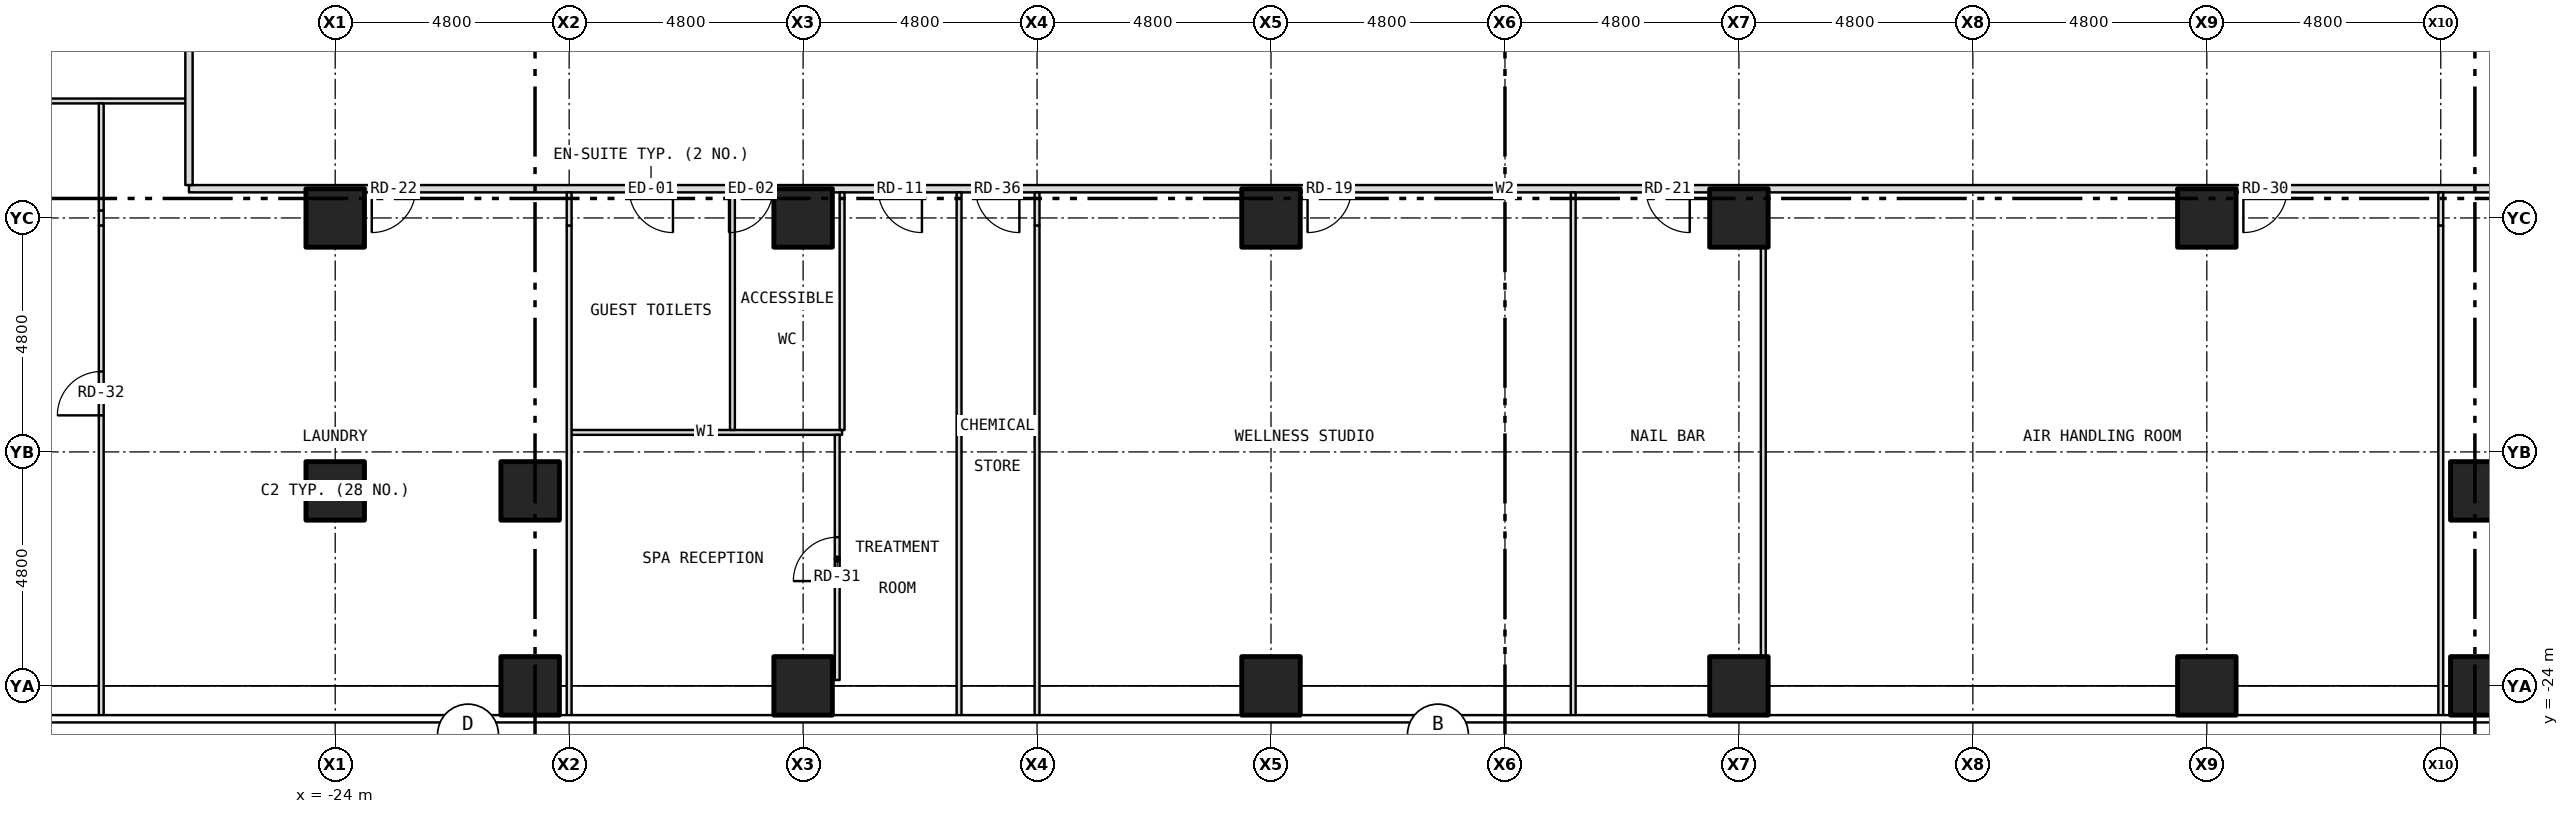
"""IFC4 building model, lengths in metres.
Left out: names, types, materials, properties, quantities, classifications, styles, units other than length and angle.
Written with IfcOpenShell. Run it as: python <this file> out.ifc"""

import sys

from ifc_helpers import new_model, si_unit, direction, frame, frame_2d, origin, origin_2d, place, context, subcontext, project, spatial, rectangle, hollow_rectangle, extrude, element, fill, save


model = new_model("IFC4")
c1 = context("Model", 3, precision=1e-05, world=origin(), true_north=direction((0.0, 1.0)))
c2 = subcontext(c1, "Body", "Model", "MODEL_VIEW")
j1 = project(units=[si_unit("LENGTHUNIT", "METRE"), si_unit("PLANEANGLEUNIT", "RADIAN")], contexts=[c1])
p1 = place(None, origin())
s1 = spatial("IfcSite", under=j1, at=p1, CompositionType="ELEMENT")
p2 = place(p1, origin())
s2 = spatial("IfcBuilding", under=s1, at=p2, CompositionType="ELEMENT")
p3 = place(p2, frame((0.0, 0.0, 20.0)))
s3 = spatial("IfcBuildingStorey", under=s2, at=p3, CompositionType="ELEMENT", Elevation=20.0)
for number, where, z_axis, x_axis in (
    (1, (-20.0, -24.0, -0.2), (0.0, 0.0, 1.0), (1.0, 0.0, 0.0)),
    (2, (-14.4, -24.0, -0.2), (0.0, 0.0, 1.0), (1.0, 0.0, 0.0)),
    (3, (-4.8, -24.0, -0.2), (0.0, 0.0, 1.0), (1.0, 0.0, 0.0)),
    (4, (4.8, -24.0, -0.2), (0.0, 0.0, 1.0), (1.0, 0.0, 0.0)),
    (5, (14.4, -24.0, -0.2), (0.0, 0.0, 1.0), (1.0, 0.0, 0.0)),
    (6, (20.0, -24.0, -0.2), (0.0, 0.0, 1.0), (1.0, 0.0, 0.0)),
    (7, (-24.0, -20.0, -0.2), (0.0, 0.0, 1.0), (1.0, 0.0, 0.0)),
    (8, (-24.0, -14.4, -0.2), (0.0, 0.0, 1.0), (1.0, 0.0, 0.0)),
    (9, (-20.0, -20.0, -0.2), (0.0, 0.0, 1.0), (1.0, 0.0, 0.0)),
    (10, (-14.4, -14.4, -0.2), (0.0, 0.0, 1.0), (1.0, 0.0, 0.0)),
    (11, (-4.8, -14.4, -0.2), (0.0, 0.0, 1.0), (1.0, 0.0, 0.0)),
    (12, (4.8, -14.4, -0.2), (0.0, 0.0, 1.0), (1.0, 0.0, 0.0)),
    (13, (14.4, -14.4, -0.2), (0.0, 0.0, 1.0), (1.0, 0.0, 0.0)),
    (14, (20.0, -20.0, -0.2), (0.0, 0.0, 1.0), (1.0, 0.0, 0.0)),
):
    element("IfcColumn", number, at=place(p3, frame(where, z_axis=z_axis, x_axis=x_axis)), inside=s3, PredefinedType="COLUMN", context=c2, shape_type="SweptSolid", body=[
        extrude(hollow_rectangle(XDim=1.2, YDim=1.2, WallThickness=0.07, at=origin_2d()), origin(), (0.0, 0.0, 1.0), 4.5),
    ])
p4 = place(p3, frame((-19.2, -18.8, 0.0), z_axis=(0.0, 0.0, 1.0), x_axis=(1.0, 0.0, 0.0)))
e15 = element("IfcWall", 15, at=p4, inside=s3, PredefinedType="PARTITIONING", context=c2, shape_type="SweptSolid", body=[
    extrude(rectangle(XDim=5.6, YDim=0.1, at=frame_2d((2.8, 0.0))), origin(), (0.0, 0.0, 1.0), 4.3),
])
p5 = place(p3, frame((-27.0, -13.8, 0.0), z_axis=(0.0, 0.0, 1.0), x_axis=(1.0, 0.0, 0.0)))
e16 = element("IfcWall", 16, at=p5, inside=s3, PredefinedType="PARTITIONING", context=c2, shape_type="SweptSolid", body=[
    extrude(rectangle(XDim=54.0, YDim=0.15, at=frame_2d((27.0, 0.0))), origin(), (0.0, 0.0, 1.0), 4.3),
])
p6 = place(p5, frame((9.03, 0.0, 0.0)))
e17 = element("IfcOpeningElement", 17, at=p6, cuts=e16, PredefinedType="OPENING", context=c2, shape_type="SweptSolid", body=[
    extrude(rectangle(XDim=0.9, YDim=2.1, at=frame_2d((0.45, 1.05))), frame((0.0, 0.087, 0.0), z_axis=(0.0, -1.0, 0.0), x_axis=(1.0, 0.0, 0.0)), (0.0, 0.0, 1.0), 0.174),
])
p7 = place(p5, frame((11.08, 0.0, 0.0)))
e18 = element("IfcOpeningElement", 18, at=p7, cuts=e16, PredefinedType="OPENING", context=c2, shape_type="SweptSolid", body=[
    extrude(rectangle(XDim=0.9, YDim=2.1, at=frame_2d((0.45, 1.05))), frame((0.0, 0.087, 0.0), z_axis=(0.0, -1.0, 0.0), x_axis=(1.0, 0.0, 0.0)), (0.0, 0.0, 1.0), 0.174),
])
p8 = place(p5, frame((14.138, 0.0, 0.0)))
e19 = element("IfcOpeningElement", 19, at=p8, cuts=e16, PredefinedType="OPENING", context=c2, shape_type="SweptSolid", body=[
    extrude(rectangle(XDim=0.9, YDim=2.1, at=frame_2d((0.45, 1.05))), frame((0.0, 0.087, 0.0), z_axis=(0.0, -1.0, 0.0), x_axis=(1.0, 0.0, 0.0)), (0.0, 0.0, 1.0), 0.174),
])
p9 = place(p5, frame((22.95, 0.0, 0.0)))
e20 = element("IfcOpeningElement", 20, at=p9, cuts=e16, PredefinedType="OPENING", context=c2, shape_type="SweptSolid", body=[
    extrude(rectangle(XDim=0.9, YDim=2.1, at=frame_2d((0.45, 1.05))), frame((0.0, 0.087, 0.0), z_axis=(0.0, -1.0, 0.0), x_axis=(1.0, 0.0, 0.0)), (0.0, 0.0, 1.0), 0.174),
])
p10 = place(p5, frame((29.891, 0.0, 0.0)))
e21 = element("IfcOpeningElement", 21, at=p10, cuts=e16, PredefinedType="OPENING", context=c2, shape_type="SweptSolid", body=[
    extrude(rectangle(XDim=0.9, YDim=2.1, at=frame_2d((0.45, 1.05))), frame((0.0, 0.087, 0.0), z_axis=(0.0, -1.0, 0.0), x_axis=(1.0, 0.0, 0.0)), (0.0, 0.0, 1.0), 0.174),
])
p11 = place(p5, frame((3.75, 0.0, 0.0)))
e22 = element("IfcOpeningElement", 22, at=p11, cuts=e16, PredefinedType="OPENING", context=c2, shape_type="SweptSolid", body=[
    extrude(rectangle(XDim=0.9, YDim=2.1, at=frame_2d((0.45, 1.05))), frame((0.0, 0.087, 0.0), z_axis=(0.0, -1.0, 0.0), x_axis=(1.0, 0.0, 0.0)), (0.0, 0.0, 1.0), 0.174),
])
p12 = place(p5, frame((49.35, 0.0, 0.0)))
e23 = element("IfcOpeningElement", 23, at=p12, cuts=e16, PredefinedType="OPENING", context=c2, shape_type="SweptSolid", body=[
    extrude(rectangle(XDim=0.9, YDim=2.1, at=frame_2d((0.45, 1.05))), frame((0.0, 0.087, 0.0), z_axis=(0.0, -1.0, 0.0), x_axis=(1.0, 0.0, 0.0)), (0.0, 0.0, 1.0), 0.174),
])
p13 = place(p5, frame((42.15, 0.0, 0.0)))
e24 = element("IfcOpeningElement", 24, at=p13, cuts=e16, PredefinedType="OPENING", context=c2, shape_type="SweptSolid", body=[
    extrude(rectangle(XDim=0.9, YDim=2.1, at=frame_2d((0.45, 1.05))), frame((0.0, 0.087, 0.0), z_axis=(0.0, -1.0, 0.0), x_axis=(1.0, 0.0, 0.0)), (0.0, 0.0, 1.0), 0.174),
])
p14 = place(p5, frame((16.137, 0.0, 0.0)))
e25 = element("IfcOpeningElement", 25, at=p14, cuts=e16, PredefinedType="OPENING", context=c2, shape_type="SweptSolid", body=[
    extrude(rectangle(XDim=0.9, YDim=2.1, at=frame_2d((0.45, 1.05))), frame((0.0, 0.087, 0.0), z_axis=(0.0, -1.0, 0.0), x_axis=(1.0, 0.0, 0.0)), (0.0, 0.0, 1.0), 0.174),
])
p15 = place(p3, frame((-38.28, -12.0, 0.0), z_axis=(0.0, 0.0, 1.0), x_axis=(1.0, 0.0, 0.0)))
e26 = element("IfcWall", 26, at=p15, inside=s3, PredefinedType="PARTITIONING", context=c2, shape_type="SweptSolid", body=[
    extrude(rectangle(XDim=11.28, YDim=0.1, at=frame_2d((5.64, 0.0))), origin(), (0.0, 0.0, 1.0), 4.3),
])
p16 = place(p3, frame((-28.8, -24.63, 0.0), z_axis=(0.0, 0.0, 1.0), x_axis=(0.0, 1.0, 0.0)))
e27 = element("IfcWall", 27, at=p16, inside=s3, PredefinedType="PARTITIONING", context=c2, shape_type="SweptSolid", body=[
    extrude(rectangle(XDim=10.076, YDim=0.1, at=frame_2d((5.038, 0.0))), origin(), (0.0, 0.0, 1.0), 3.683),
])
p17 = place(p16, frame((6.18, 0.0, 0.0)))
e28 = element("IfcOpeningElement", 28, at=p17, cuts=e27, PredefinedType="OPENING", context=c2, shape_type="SweptSolid", body=[
    extrude(rectangle(XDim=0.9, YDim=2.1, at=frame_2d((0.45, 1.05))), frame((0.0, 0.062, 0.0), z_axis=(0.0, -1.0, 0.0), x_axis=(1.0, 0.0, 0.0)), (0.0, 0.0, 1.0), 0.124),
])
p18 = place(p3, frame((-28.8, -14.554, 0.0), z_axis=(0.0, 0.0, 1.0), x_axis=(0.0, 1.0, 0.0)))
e29 = element("IfcWall", 29, at=p18, inside=s3, PredefinedType="PARTITIONING", context=c2, shape_type="SweptSolid", body=[
    extrude(rectangle(XDim=0.308, YDim=0.1, at=frame_2d((0.154, 0.0))), origin(), (0.0, 0.0, 1.0), 4.3),
])
p19 = place(p3, frame((-28.8, -14.246, 0.0), z_axis=(0.0, 0.0, 1.0), x_axis=(0.0, 1.0, 0.0)))
e30 = element("IfcWall", 30, at=p19, inside=s3, PredefinedType="PARTITIONING", context=c2, shape_type="SweptSolid", body=[
    extrude(rectangle(XDim=2.196, YDim=0.1, at=frame_2d((1.098, 0.0))), origin(), (0.0, 0.0, 1.0), 3.683),
])
p20 = place(p3, frame((-27.0, -13.725, 0.0), z_axis=(0.0, 0.0, 1.0), x_axis=(0.0, 1.0, 0.0)))
e31 = element("IfcWall", 31, at=p20, inside=s3, PredefinedType="PARTITIONING", context=c2, shape_type="SweptSolid", body=[
    extrude(rectangle(XDim=27.45, YDim=0.15, at=frame_2d((13.725, 0.0))), origin(), (0.0, 0.0, 1.0), 4.3),
])
p21 = place(p20, frame((7.275, 0.0, 0.0)))
e32 = element("IfcOpeningElement", 32, at=p21, cuts=e31, PredefinedType="OPENING", context=c2, shape_type="SweptSolid", body=[
    extrude(rectangle(XDim=0.9, YDim=2.1, at=frame_2d((0.45, 1.05))), frame((0.0, 0.087, 0.0), z_axis=(0.0, -1.0, 0.0), x_axis=(1.0, 0.0, 0.0)), (0.0, 0.0, 1.0), 0.174),
])
p22 = place(p20, frame((19.275, 0.0, 0.0)))
e33 = element("IfcOpeningElement", 33, at=p22, cuts=e31, PredefinedType="OPENING", context=c2, shape_type="SweptSolid", body=[
    extrude(rectangle(XDim=0.9, YDim=2.1, at=frame_2d((0.45, 1.05))), frame((0.0, 0.087, 0.0), z_axis=(0.0, -1.0, 0.0), x_axis=(1.0, 0.0, 0.0)), (0.0, 0.0, 1.0), 0.174),
])
p23 = place(p3, frame((-19.2, -24.63, 0.0), z_axis=(0.0, 0.0, 1.0), x_axis=(0.0, 1.0, 0.0)))
e34 = element("IfcWall", 34, at=p23, inside=s3, PredefinedType="PARTITIONING", context=c2, shape_type="SweptSolid", body=[
    extrude(rectangle(XDim=10.076, YDim=0.1, at=frame_2d((5.038, 0.0))), origin(), (0.0, 0.0, 1.0), 3.683),
])
p24 = place(p3, frame((-19.2, -14.554, 0.0), z_axis=(0.0, 0.0, 1.0), x_axis=(0.0, 1.0, 0.0)))
e35 = element("IfcWall", 35, at=p24, inside=s3, PredefinedType="PARTITIONING", context=c2, shape_type="SweptSolid", body=[
    extrude(rectangle(XDim=0.679, YDim=0.1, at=frame_2d((0.339, 0.0))), origin(), (0.0, 0.0, 1.0), 4.3),
])
p25 = place(p3, frame((-15.85, -18.75, 0.0), z_axis=(0.0, 0.0, 1.0), x_axis=(0.0, 1.0, 0.0)))
e36 = element("IfcWall", 36, at=p25, inside=s3, PredefinedType="PARTITIONING", context=c2, shape_type="SweptSolid", body=[
    extrude(rectangle(XDim=4.875, YDim=0.1, at=frame_2d((2.438, 0.0))), origin(), (0.0, 0.0, 1.0), 4.3),
])
p26 = place(p3, frame((-13.7, -23.88, 0.0), z_axis=(0.0, 0.0, 1.0), x_axis=(0.0, 1.0, 0.0)))
e37 = element("IfcWall", 37, at=p26, inside=s3, PredefinedType="PARTITIONING", context=c2, shape_type="SweptSolid", body=[
    extrude(rectangle(XDim=5.03, YDim=0.1, at=frame_2d((2.515, 0.0))), origin(), (0.0, 0.0, 1.0), 4.3),
])
p27 = place(p26, frame((2.03, 0.0, 0.0)))
e38 = element("IfcOpeningElement", 38, at=p27, cuts=e37, PredefinedType="OPENING", context=c2, shape_type="SweptSolid", body=[
    extrude(rectangle(XDim=0.9, YDim=2.1, at=frame_2d((0.45, 1.05))), frame((0.0, 0.062, 0.0), z_axis=(0.0, -1.0, 0.0), x_axis=(1.0, 0.0, 0.0)), (0.0, 0.0, 1.0), 0.124),
])
p28 = place(p3, frame((-13.6, -18.75, 0.0), z_axis=(0.0, 0.0, 1.0), x_axis=(0.0, 1.0, 0.0)))
e39 = element("IfcWall", 39, at=p28, inside=s3, PredefinedType="PARTITIONING", context=c2, shape_type="SweptSolid", body=[
    extrude(rectangle(XDim=4.875, YDim=0.1, at=frame_2d((2.438, 0.0))), origin(), (0.0, 0.0, 1.0), 4.3),
])
p29 = place(p3, frame((-11.2, -24.63, 0.0), z_axis=(0.0, 0.0, 1.0), x_axis=(0.0, 1.0, 0.0)))
e40 = element("IfcWall", 40, at=p29, inside=s3, PredefinedType="PARTITIONING", context=c2, shape_type="SweptSolid", body=[
    extrude(rectangle(XDim=10.755, YDim=0.1, at=frame_2d((5.377, 0.0))), origin(), (0.0, 0.0, 1.0), 4.3),
])
p30 = place(p3, frame((-9.6, -24.63, 0.0), z_axis=(0.0, 0.0, 1.0), x_axis=(0.0, 1.0, 0.0)))
e41 = element("IfcWall", 41, at=p30, inside=s3, PredefinedType="PARTITIONING", context=c2, shape_type="SweptSolid", body=[
    extrude(rectangle(XDim=10.076, YDim=0.1, at=frame_2d((5.038, 0.0))), origin(), (0.0, 0.0, 1.0), 3.683),
])
p31 = place(p3, frame((-9.6, -14.554, 0.0), z_axis=(0.0, 0.0, 1.0), x_axis=(0.0, 1.0, 0.0)))
e42 = element("IfcWall", 42, at=p31, inside=s3, PredefinedType="PARTITIONING", context=c2, shape_type="SweptSolid", body=[
    extrude(rectangle(XDim=0.679, YDim=0.1, at=frame_2d((0.339, 0.0))), origin(), (0.0, 0.0, 1.0), 4.3),
])
p32 = place(p3, frame((1.4, -24.63, 0.0), z_axis=(0.0, 0.0, 1.0), x_axis=(0.0, 1.0, 0.0)))
e43 = element("IfcWall", 43, at=p32, inside=s3, PredefinedType="PARTITIONING", context=c2, shape_type="SweptSolid", body=[
    extrude(rectangle(XDim=10.755, YDim=0.1, at=frame_2d((5.377, 0.0))), origin(), (0.0, 0.0, 1.0), 4.3),
])
p33 = place(p3, frame((5.3, -23.88, 0.0), z_axis=(0.0, 0.0, 1.0), x_axis=(0.0, 1.0, 0.0)))
e44 = element("IfcWall", 44, at=p33, inside=s3, PredefinedType="PARTITIONING", context=c2, shape_type="SweptSolid", body=[
    extrude(rectangle(XDim=10.005, YDim=0.1, at=frame_2d((5.002, 0.0))), origin(), (0.0, 0.0, 1.0), 4.3),
])
p34 = place(p3, frame((19.2, -24.63, 0.0), z_axis=(0.0, 0.0, 1.0), x_axis=(0.0, 1.0, 0.0)))
e45 = element("IfcWall", 45, at=p34, inside=s3, PredefinedType="PARTITIONING", context=c2, shape_type="SweptSolid", body=[
    extrude(rectangle(XDim=10.076, YDim=0.1, at=frame_2d((5.038, 0.0))), origin(), (0.0, 0.0, 1.0), 3.683),
])
p35 = place(p3, frame((19.2, -14.554, 0.0), z_axis=(0.0, 0.0, 1.0), x_axis=(0.0, 1.0, 0.0)))
e46 = element("IfcWall", 46, at=p35, inside=s3, PredefinedType="PARTITIONING", context=c2, shape_type="SweptSolid", body=[
    extrude(rectangle(XDim=0.679, YDim=0.1, at=frame_2d((0.339, 0.0))), origin(), (0.0, 0.0, 1.0), 4.3),
])
p36 = place(p6, origin())
e47 = element("IfcDoor", 47, at=p36, inside=s3, OperationType="SINGLE_SWING_RIGHT", PredefinedType="DOOR", context=c2, shape_type="SweptSolid", body=[
    extrude(rectangle(XDim=0.9, YDim=2.1, at=frame_2d((0.45, 1.05))), frame((0.0, 0.025, 0.0), z_axis=(0.0, -1.0, 0.0), x_axis=(1.0, 0.0, 0.0)), (0.0, 0.0, 1.0), 0.05),
])
fill(e17, e47)
p37 = place(p7, origin())
e48 = element("IfcDoor", 48, at=p37, inside=s3, OperationType="SINGLE_SWING_LEFT", PredefinedType="DOOR", context=c2, shape_type="SweptSolid", body=[
    extrude(rectangle(XDim=0.9, YDim=2.1, at=frame_2d((0.45, 1.05))), frame((0.0, 0.025, 0.0), z_axis=(0.0, -1.0, 0.0), x_axis=(1.0, 0.0, 0.0)), (0.0, 0.0, 1.0), 0.05),
])
fill(e18, e48)
p38 = place(p8, origin())
e49 = element("IfcDoor", 49, at=p38, inside=s3, OperationType="SINGLE_SWING_RIGHT", PredefinedType="DOOR", context=c2, shape_type="SweptSolid", body=[
    extrude(rectangle(XDim=0.9, YDim=2.1, at=frame_2d((0.45, 1.05))), frame((0.0, 0.025, 0.0), z_axis=(0.0, -1.0, 0.0), x_axis=(1.0, 0.0, 0.0)), (0.0, 0.0, 1.0), 0.05),
])
fill(e19, e49)
p39 = place(p9, origin())
e50 = element("IfcDoor", 50, at=p39, inside=s3, OperationType="SINGLE_SWING_LEFT", PredefinedType="DOOR", context=c2, shape_type="SweptSolid", body=[
    extrude(rectangle(XDim=0.9, YDim=2.1, at=frame_2d((0.45, 1.05))), frame((0.0, 0.025, 0.0), z_axis=(0.0, -1.0, 0.0), x_axis=(1.0, 0.0, 0.0)), (0.0, 0.0, 1.0), 0.05),
])
fill(e20, e50)
p40 = place(p10, origin())
e51 = element("IfcDoor", 51, at=p40, inside=s3, OperationType="SINGLE_SWING_RIGHT", PredefinedType="DOOR", context=c2, shape_type="SweptSolid", body=[
    extrude(rectangle(XDim=0.9, YDim=2.1, at=frame_2d((0.45, 1.05))), frame((0.0, 0.025, 0.0), z_axis=(0.0, -1.0, 0.0), x_axis=(1.0, 0.0, 0.0)), (0.0, 0.0, 1.0), 0.05),
])
fill(e21, e51)
p41 = place(p11, origin())
e52 = element("IfcDoor", 52, at=p41, inside=s3, OperationType="SINGLE_SWING_LEFT", PredefinedType="DOOR", context=c2, shape_type="SweptSolid", body=[
    extrude(rectangle(XDim=0.9, YDim=2.1, at=frame_2d((0.45, 1.05))), frame((0.0, 0.025, 0.0), z_axis=(0.0, -1.0, 0.0), x_axis=(1.0, 0.0, 0.0)), (0.0, 0.0, 1.0), 0.05),
])
fill(e22, e52)
p42 = place(p13, origin())
e53 = element("IfcDoor", 53, at=p42, inside=s3, OperationType="SINGLE_SWING_LEFT", PredefinedType="DOOR", context=c2, shape_type="SweptSolid", body=[
    extrude(rectangle(XDim=0.9, YDim=2.1, at=frame_2d((0.45, 1.05))), frame((0.0, 0.025, 0.0), z_axis=(0.0, -1.0, 0.0), x_axis=(1.0, 0.0, 0.0)), (0.0, 0.0, 1.0), 0.05),
])
fill(e24, e53)
p43 = place(p27, origin())
e54 = element("IfcDoor", 54, at=p43, inside=s3, OperationType="SINGLE_SWING_LEFT", PredefinedType="DOOR", context=c2, shape_type="SweptSolid", body=[
    extrude(rectangle(XDim=0.9, YDim=2.1, at=frame_2d((0.45, 1.05))), frame((0.0, 0.025, 0.0), z_axis=(0.0, -1.0, 0.0), x_axis=(1.0, 0.0, 0.0)), (0.0, 0.0, 1.0), 0.05),
])
fill(e38, e54)
p44 = place(p17, origin())
e55 = element("IfcDoor", 55, at=p44, inside=s3, OperationType="SINGLE_SWING_LEFT", PredefinedType="DOOR", context=c2, shape_type="SweptSolid", body=[
    extrude(rectangle(XDim=0.9, YDim=2.1, at=frame_2d((0.45, 1.05))), frame((0.0, 0.025, 0.0), z_axis=(0.0, -1.0, 0.0), x_axis=(1.0, 0.0, 0.0)), (0.0, 0.0, 1.0), 0.05),
])
fill(e28, e55)
p45 = place(p14, origin())
e56 = element("IfcDoor", 56, at=p45, inside=s3, OperationType="SINGLE_SWING_RIGHT", PredefinedType="DOOR", context=c2, shape_type="SweptSolid", body=[
    extrude(rectangle(XDim=0.9, YDim=2.1, at=frame_2d((0.45, 1.05))), frame((0.0, 0.025, 0.0), z_axis=(0.0, -1.0, 0.0), x_axis=(1.0, 0.0, 0.0)), (0.0, 0.0, 1.0), 0.05),
])
fill(e25, e56)
save(model, sys.argv[1])
